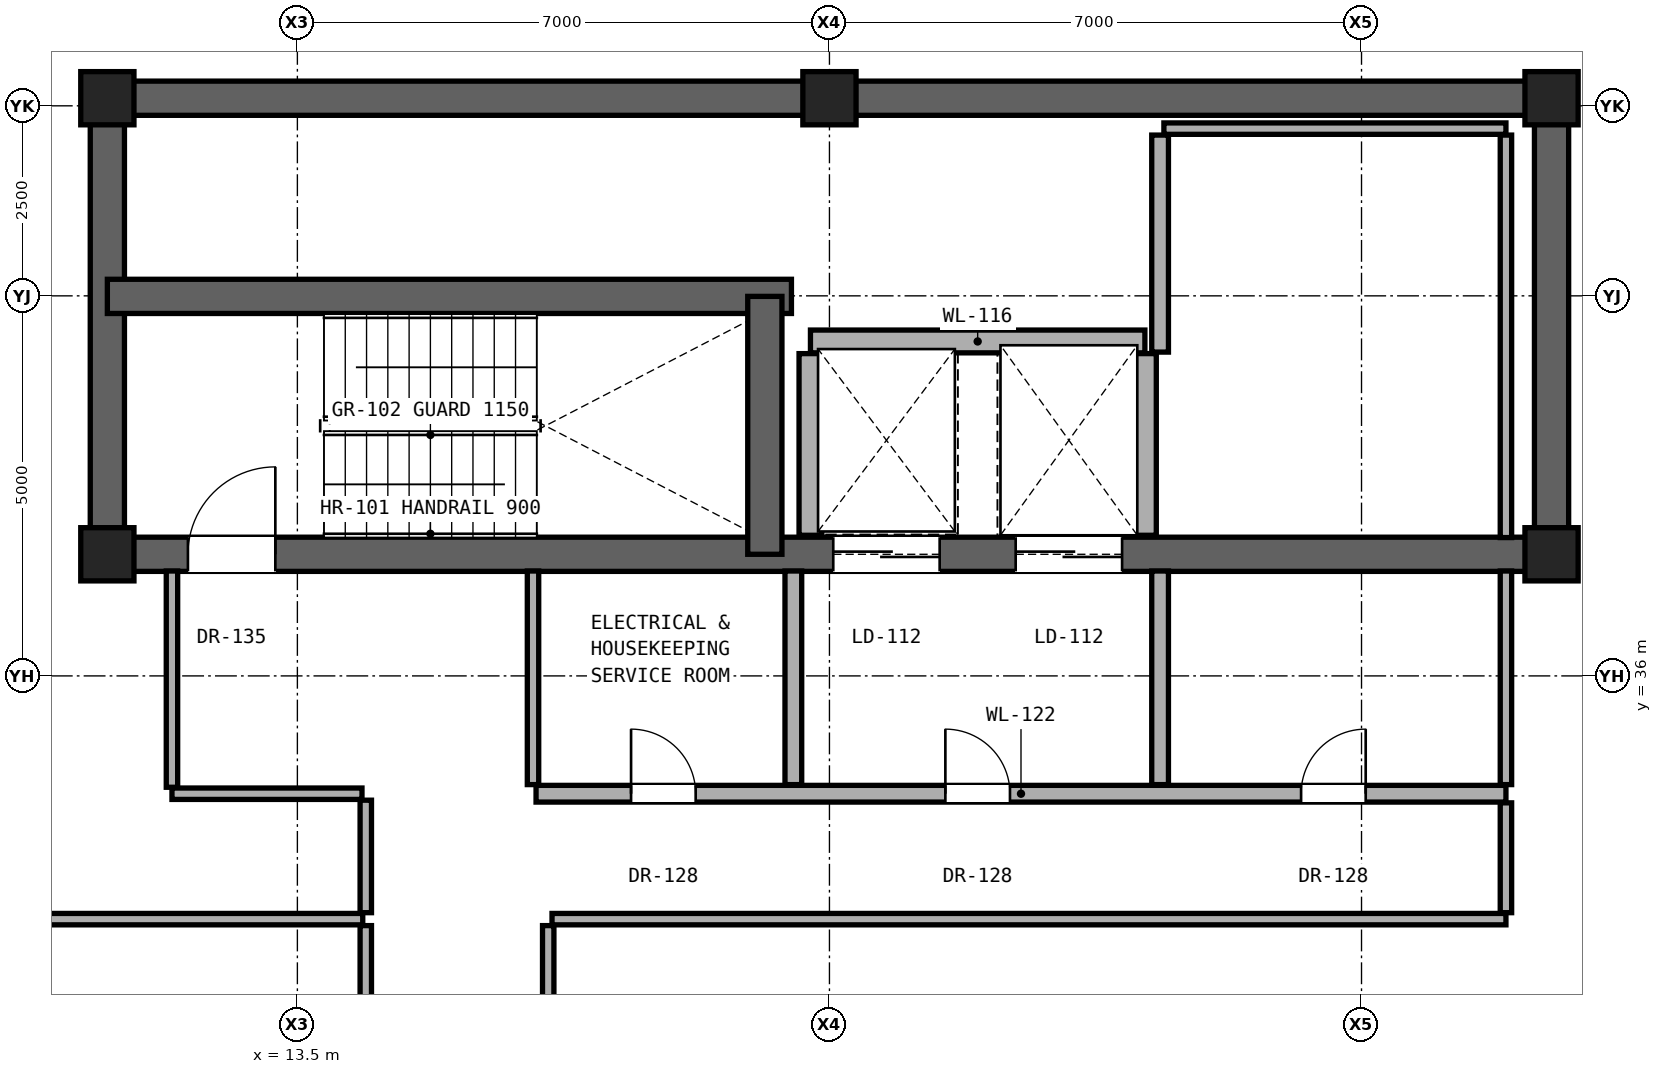
"""IFC4 building model, lengths in metres.
Left out: names, types, materials, properties, quantities, classifications, styles, units other than length and angle.
Written with IfcOpenShell. Run it as: python <this file> out.ifc"""

import sys

from ifc_helpers import new_model, si_unit, direction, frame, frame_2d, origin, origin_2d, place, context, subcontext, project, spatial, rectangle, extrude, element, fill, save


model = new_model("IFC4")
c1 = context("Model", 3, precision=1e-05, world=origin(), true_north=direction((0.0, 1.0)))
c2 = subcontext(c1, "Body", "Model", "MODEL_VIEW")
j1 = project(units=[si_unit("LENGTHUNIT", "METRE"), si_unit("PLANEANGLEUNIT", "RADIAN")], contexts=[c1])
p1 = place(None, origin())
s1 = spatial("IfcSite", under=j1, at=p1, CompositionType="ELEMENT")
p2 = place(p1, origin())
s2 = spatial("IfcBuilding", under=s1, at=p2, CompositionType="ELEMENT")
p3 = place(p2, frame((0.0, 0.0, 273.9)))
s3 = spatial("IfcBuildingStorey", under=s2, at=p3, CompositionType="ELEMENT", Elevation=273.9)
for number, where, z_axis, x_axis in (
    (1, (11.0, 37.6, 0.0), (0.0, 0.0, 1.0), (1.0, 0.0, 0.0)),
    (2, (30.0, 37.6, 0.0), (0.0, 0.0, 1.0), (1.0, 0.0, 0.0)),
    (3, (11.0, 43.6, 0.0), (0.0, 0.0, 1.0), (1.0, 0.0, 0.0)),
    (4, (20.5, 43.6, 0.0), (0.0, 0.0, 1.0), (1.0, 0.0, 0.0)),
    (5, (30.0, 43.6, 0.0), (0.0, 0.0, 1.0), (1.0, 0.0, 0.0)),
):
    element("IfcColumn", number, at=place(p3, frame(where, z_axis=z_axis, x_axis=x_axis)), inside=s3, PredefinedType="COLUMN", context=c2, shape_type="SweptSolid", body=[
        extrude(rectangle(XDim=0.7, YDim=0.7, at=origin_2d()), origin(), (0.0, 0.0, 1.0), 2.6),
    ])
p4 = place(p3, frame((11.0, 43.6, 0.0), z_axis=(0.0, 0.0, 1.0), x_axis=(1.0, 0.0, 0.0)))
e6 = element("IfcWall", 6, at=p4, inside=s3, PredefinedType="SHEAR", context=c2, shape_type="SweptSolid", body=[
    extrude(rectangle(XDim=19.0, YDim=0.45, at=frame_2d((9.5, 0.0))), origin(), (0.0, 0.0, 1.0), 2.37),
])
p5 = place(p3, frame((11.0, 37.6, 0.0), z_axis=(0.0, 0.0, 1.0), x_axis=(0.0, 1.0, 0.0)))
e7 = element("IfcWall", 7, at=p5, inside=s3, PredefinedType="SHEAR", context=c2, shape_type="SweptSolid", body=[
    extrude(rectangle(XDim=6.0, YDim=0.45, at=frame_2d((3.0, 0.0))), origin(), (0.0, 0.0, 1.0), 1.79),
])
p6 = place(p3, frame((30.0, 37.6, 0.0), z_axis=(0.0, 0.0, 1.0), x_axis=(0.0, 1.0, 0.0)))
e8 = element("IfcWall", 8, at=p6, inside=s3, PredefinedType="SHEAR", context=c2, shape_type="SweptSolid", body=[
    extrude(rectangle(XDim=6.0, YDim=0.45, at=frame_2d((3.0, 0.0))), origin(), (0.0, 0.0, 1.0), 2.37),
])
p7 = place(p3, frame((11.0, 37.6, 0.0), z_axis=(0.0, 0.0, 1.0), x_axis=(1.0, 0.0, 0.0)))
e9 = element("IfcWall", 9, at=p7, inside=s3, PredefinedType="SHEAR", context=c2, shape_type="SweptSolid", body=[
    extrude(rectangle(XDim=19.0, YDim=0.45, at=frame_2d((9.5, 0.0))), origin(), (0.0, 0.0, 1.0), 2.37),
])
p8 = place(p7, frame((1.06, 0.0, 0.0)))
e10 = element("IfcOpeningElement", 10, at=p8, cuts=e9, PredefinedType="OPENING", context=c2, shape_type="SweptSolid", body=[
    extrude(rectangle(XDim=1.15, YDim=2.2, at=frame_2d((0.575, 1.1))), frame((0.0, 0.235, 0.0), z_axis=(0.0, -1.0, 0.0), x_axis=(1.0, 0.0, 0.0)), (0.0, 0.0, 1.0), 0.47),
])
p9 = place(p7, frame((9.55, 0.0, 0.0)))
e11 = element("IfcOpeningElement", 11, at=p9, cuts=e9, PredefinedType="OPENING", context=c2, shape_type="SweptSolid", body=[
    extrude(rectangle(XDim=1.4, YDim=2.35, at=frame_2d((0.7, 1.175))), frame((0.0, 0.235, 0.0), z_axis=(0.0, -1.0, 0.0), x_axis=(1.0, 0.0, 0.0)), (0.0, 0.0, 1.0), 0.47),
])
p10 = place(p7, frame((11.95, 0.0, 0.0)))
e12 = element("IfcOpeningElement", 12, at=p10, cuts=e9, PredefinedType="OPENING", context=c2, shape_type="SweptSolid", body=[
    extrude(rectangle(XDim=1.4, YDim=2.35, at=frame_2d((0.7, 1.175))), frame((0.0, 0.235, 0.0), z_axis=(0.0, -1.0, 0.0), x_axis=(1.0, 0.0, 0.0)), (0.0, 0.0, 1.0), 0.47),
])
p11 = place(p3, frame((11.0, 40.993, 0.0), z_axis=(0.0, 0.0, 1.0), x_axis=(1.0, 0.0, 0.0)))
e13 = element("IfcWall", 13, at=p11, inside=s3, PredefinedType="SHEAR", context=c2, shape_type="SweptSolid", body=[
    extrude(rectangle(XDim=9.0, YDim=0.45, at=frame_2d((4.5, 0.0))), origin(), (0.0, 0.0, 1.0), 2.37),
])
p12 = place(p3, frame((19.65, 37.6, 0.0), z_axis=(0.0, 0.0, 1.0), x_axis=(0.0, 1.0, 0.0)))
e14 = element("IfcWall", 14, at=p12, inside=s3, PredefinedType="SHEAR", context=c2, shape_type="SweptSolid", body=[
    extrude(rectangle(XDim=3.393, YDim=0.45, at=frame_2d((1.696, 0.0))), origin(), (0.0, 0.0, 1.0), 2.37),
])
p13 = place(p3, frame((3.2, 32.8, 0.0), z_axis=(0.0, 0.0, 1.0), x_axis=(1.0, 0.0, 0.0)))
e15 = element("IfcWall", 15, at=p13, inside=s3, PredefinedType="PARTITIONING", context=c2, shape_type="SweptSolid", body=[
    extrude(rectangle(XDim=11.16, YDim=0.15, at=frame_2d((5.58, 0.0))), origin(), (0.0, 0.0, 1.0), 2.032),
])
p14 = place(p3, frame((16.85, 32.8, 0.0), z_axis=(0.0, 0.0, 1.0), x_axis=(1.0, 0.0, 0.0)))
e16 = element("IfcWall", 16, at=p14, inside=s3, PredefinedType="PARTITIONING", context=c2, shape_type="SweptSolid", body=[
    extrude(rectangle(XDim=12.55, YDim=0.15, at=frame_2d((6.275, 0.0))), origin(), (0.0, 0.0, 1.0), 2.032),
])
p15 = place(p3, frame((11.85, 34.45, 0.0), z_axis=(0.0, 0.0, 1.0), x_axis=(1.0, 0.0, 0.0)))
e17 = element("IfcWall", 17, at=p15, inside=s3, PredefinedType="PARTITIONING", context=c2, shape_type="SweptSolid", body=[
    extrude(rectangle(XDim=2.5, YDim=0.15, at=frame_2d((1.25, 0.0))), origin(), (0.0, 0.0, 1.0), 2.37),
])
p16 = place(p3, frame((16.64, 34.45, 0.0), z_axis=(0.0, 0.0, 1.0), x_axis=(1.0, 0.0, 0.0)))
e18 = element("IfcWall", 18, at=p16, inside=s3, PredefinedType="SOLIDWALL", context=c2, shape_type="SweptSolid", body=[
    extrude(rectangle(XDim=12.76, YDim=0.22, at=frame_2d((6.38, 0.0))), origin(), (0.0, 0.0, 1.0), 2.032),
])
p17 = place(p16, frame((5.385, 0.0, 0.0)))
e19 = element("IfcOpeningElement", 19, at=p17, cuts=e18, PredefinedType="OPENING", context=c2, shape_type="SweptSolid", body=[
    extrude(rectangle(XDim=0.85, YDim=2.01, at=frame_2d((0.425, 1.005))), frame((0.0, 0.12, 0.0), z_axis=(0.0, -1.0, 0.0), x_axis=(1.0, 0.0, 0.0)), (0.0, 0.0, 1.0), 0.24),
])
p18 = place(p16, frame((10.065, 0.0, 0.0)))
e20 = element("IfcOpeningElement", 20, at=p18, cuts=e18, PredefinedType="OPENING", context=c2, shape_type="SweptSolid", body=[
    extrude(rectangle(XDim=0.85, YDim=2.01, at=frame_2d((0.425, 1.005))), frame((0.0, 0.12, 0.0), z_axis=(0.0, -1.0, 0.0), x_axis=(1.0, 0.0, 0.0)), (0.0, 0.0, 1.0), 0.24),
])
p19 = place(p16, frame((1.25, 0.0, 0.0)))
e21 = element("IfcOpeningElement", 21, at=p19, cuts=e18, PredefinedType="OPENING", context=c2, shape_type="SweptSolid", body=[
    extrude(rectangle(XDim=0.85, YDim=2.01, at=frame_2d((0.425, 1.005))), frame((0.0, 0.12, 0.0), z_axis=(0.0, -1.0, 0.0), x_axis=(1.0, 0.0, 0.0)), (0.0, 0.0, 1.0), 0.24),
])
p20 = place(p3, frame((20.25, 40.4, 0.0), z_axis=(0.0, 0.0, 1.0), x_axis=(1.0, 0.0, 0.0)))
e22 = element("IfcWall", 22, at=p20, inside=s3, PredefinedType="SOLIDWALL", context=c2, shape_type="SweptSolid", body=[
    extrude(rectangle(XDim=4.4, YDim=0.3, at=frame_2d((2.2, 0.0))), origin(), (0.0, 0.0, 1.0), 2.37),
])
p21 = place(p3, frame((24.9, 43.2, 0.0), z_axis=(0.0, 0.0, 1.0), x_axis=(1.0, 0.0, 0.0)))
e23 = element("IfcWall", 23, at=p21, inside=s3, PredefinedType="PARTITIONING", context=c2, shape_type="SweptSolid", body=[
    extrude(rectangle(XDim=4.5, YDim=0.15, at=frame_2d((2.25, 0.0))), origin(), (0.0, 0.0, 1.0), 2.37),
])
p22 = place(p3, frame((11.85, 34.535, 0.0), z_axis=(0.0, 0.0, 1.0), x_axis=(0.0, 1.0, 0.0)))
e24 = element("IfcWall", 24, at=p22, inside=s3, PredefinedType="PARTITIONING", context=c2, shape_type="SweptSolid", body=[
    extrude(rectangle(XDim=2.845, YDim=0.15, at=frame_2d((1.422, 0.0))), origin(), (0.0, 0.0, 1.0), 2.37),
])
p23 = place(p3, frame((14.4, 20.785, 0.0), z_axis=(0.0, 0.0, 1.0), x_axis=(0.0, 1.0, 0.0)))
e25 = element("IfcWall", 25, at=p23, inside=s3, PredefinedType="PARTITIONING", context=c2, shape_type="SweptSolid", body=[
    extrude(rectangle(XDim=11.93, YDim=0.15, at=frame_2d((5.965, 0.0))), origin(), (0.0, 0.0, 1.0), 2.032),
])
p24 = place(p23, frame((5.54, 0.0, 0.0)))
e26 = element("IfcOpeningElement", 26, at=p24, cuts=e25, PredefinedType="OPENING", context=c2, shape_type="SweptSolid", body=[
    extrude(rectangle(XDim=0.85, YDim=2.01, at=frame_2d((0.425, 1.005))), frame((0.0, 0.085, 0.0), z_axis=(0.0, -1.0, 0.0), x_axis=(1.0, 0.0, 0.0)), (0.0, 0.0, 1.0), 0.17),
])
p25 = place(p3, frame((14.4, 32.885, 0.0), z_axis=(0.0, 0.0, 1.0), x_axis=(0.0, 1.0, 0.0)))
e27 = element("IfcWall", 27, at=p25, inside=s3, PredefinedType="PARTITIONING", context=c2, shape_type="SweptSolid", body=[
    extrude(rectangle(XDim=1.48, YDim=0.15, at=frame_2d((0.74, 0.0))), origin(), (0.0, 0.0, 1.0), 2.37),
])
p26 = place(p3, frame((16.6, 34.57, 0.0), z_axis=(0.0, 0.0, 1.0), x_axis=(0.0, 1.0, 0.0)))
e28 = element("IfcWall", 28, at=p26, inside=s3, PredefinedType="PARTITIONING", context=c2, shape_type="SweptSolid", body=[
    extrude(rectangle(XDim=2.81, YDim=0.15, at=frame_2d((1.405, 0.0))), origin(), (0.0, 0.0, 1.0), 2.37),
])
p27 = place(p3, frame((16.8, 20.785, 0.0), z_axis=(0.0, 0.0, 1.0), x_axis=(0.0, 1.0, 0.0)))
e29 = element("IfcWall", 29, at=p27, inside=s3, PredefinedType="PARTITIONING", context=c2, shape_type="SweptSolid", body=[
    extrude(rectangle(XDim=11.93, YDim=0.15, at=frame_2d((5.965, 0.0))), origin(), (0.0, 0.0, 1.0), 2.032),
])
p28 = place(p27, frame((6.79, 0.0, 0.0)))
e30 = element("IfcOpeningElement", 30, at=p28, cuts=e29, PredefinedType="OPENING", context=c2, shape_type="SweptSolid", body=[
    extrude(rectangle(XDim=0.85, YDim=2.01, at=frame_2d((0.425, 1.005))), frame((0.0, 0.085, 0.0), z_axis=(0.0, -1.0, 0.0), x_axis=(1.0, 0.0, 0.0)), (0.0, 0.0, 1.0), 0.17),
])
p29 = place(p27, frame((1.39, 0.0, 0.0)))
e31 = element("IfcOpeningElement", 31, at=p29, cuts=e29, PredefinedType="OPENING", context=c2, shape_type="SweptSolid", body=[
    extrude(rectangle(XDim=0.85, YDim=2.01, at=frame_2d((0.425, 1.005))), frame((0.0, 0.085, 0.0), z_axis=(0.0, -1.0, 0.0), x_axis=(1.0, 0.0, 0.0)), (0.0, 0.0, 1.0), 0.17),
])
p30 = place(p3, frame((20.025, 34.57, 0.0), z_axis=(0.0, 0.0, 1.0), x_axis=(0.0, 1.0, 0.0)))
e32 = element("IfcWall", 32, at=p30, inside=s3, PredefinedType="SOLIDWALL", context=c2, shape_type="SweptSolid", body=[
    extrude(rectangle(XDim=2.81, YDim=0.22, at=frame_2d((1.405, 0.0))), origin(), (0.0, 0.0, 1.0), 2.37),
])
for number, where, z_axis, x_axis in (
    (33, (20.25, 37.85, 0.0), (0.0, 0.0, 1.0), (0.0, 1.0, 0.0)),
    (34, (24.65, 37.85, 0.0), (0.0, 0.0, 1.0), (0.0, 1.0, 0.0)),
):
    element("IfcWall", number, at=place(p3, frame(where, z_axis=z_axis, x_axis=x_axis)), inside=s3, PredefinedType="SOLIDWALL", context=c2, shape_type="SweptSolid", body=[
        extrude(rectangle(XDim=2.39, YDim=0.3, at=frame_2d((1.195, 0.0))), origin(), (0.0, 0.0, 1.0), 2.37),
    ])
p31 = place(p3, frame((24.85, 34.57, 0.0), z_axis=(0.0, 0.0, 1.0), x_axis=(0.0, 1.0, 0.0)))
e35 = element("IfcWall", 35, at=p31, inside=s3, PredefinedType="SOLIDWALL", context=c2, shape_type="SweptSolid", body=[
    extrude(rectangle(XDim=2.81, YDim=0.22, at=frame_2d((1.405, 0.0))), origin(), (0.0, 0.0, 1.0), 2.37),
])
p32 = place(p3, frame((24.85, 40.26, 0.0), z_axis=(0.0, 0.0, 1.0), x_axis=(0.0, 1.0, 0.0)))
e36 = element("IfcWall", 36, at=p32, inside=s3, PredefinedType="SOLIDWALL", context=c2, shape_type="SweptSolid", body=[
    extrude(rectangle(XDim=2.855, YDim=0.22, at=frame_2d((1.427, 0.0))), origin(), (0.0, 0.0, 1.0), 2.37),
])
p33 = place(p3, frame((29.4, 32.885, 0.0), z_axis=(0.0, 0.0, 1.0), x_axis=(0.0, 1.0, 0.0)))
e37 = element("IfcWall", 37, at=p33, inside=s3, PredefinedType="PARTITIONING", context=c2, shape_type="SweptSolid", body=[
    extrude(rectangle(XDim=1.445, YDim=0.15, at=frame_2d((0.723, 0.0))), origin(), (0.0, 0.0, 1.0), 2.37),
])
p34 = place(p3, frame((29.4, 34.57, 0.0), z_axis=(0.0, 0.0, 1.0), x_axis=(0.0, 1.0, 0.0)))
e38 = element("IfcWall", 38, at=p34, inside=s3, PredefinedType="PARTITIONING", context=c2, shape_type="SweptSolid", body=[
    extrude(rectangle(XDim=2.81, YDim=0.15, at=frame_2d((1.405, 0.0))), origin(), (0.0, 0.0, 1.0), 2.37),
])
p35 = place(p3, frame((29.4, 37.82, 0.0), z_axis=(0.0, 0.0, 1.0), x_axis=(0.0, 1.0, 0.0)))
e39 = element("IfcWall", 39, at=p35, inside=s3, PredefinedType="PARTITIONING", context=c2, shape_type="SweptSolid", body=[
    extrude(rectangle(XDim=5.295, YDim=0.15, at=frame_2d((2.647, 0.0))), origin(), (0.0, 0.0, 1.0), 2.37),
])
p36 = place(p8, origin())
e40 = element("IfcDoor", 40, at=p36, inside=s3, OperationType="SINGLE_SWING_RIGHT", PredefinedType="DOOR", context=c2, shape_type="SweptSolid", body=[
    extrude(rectangle(XDim=1.15, YDim=2.2, at=frame_2d((0.575, 1.1))), frame((0.0, 0.025, 0.0), z_axis=(0.0, -1.0, 0.0), x_axis=(1.0, 0.0, 0.0)), (0.0, 0.0, 1.0), 0.05),
])
fill(e10, e40)
p37 = place(p17, origin())
e41 = element("IfcDoor", 41, at=p37, inside=s3, OperationType="SINGLE_SWING_LEFT", PredefinedType="DOOR", context=c2, shape_type="SweptSolid", body=[
    extrude(rectangle(XDim=0.85, YDim=2.01, at=frame_2d((0.425, 1.005))), frame((0.0, 0.025, 0.0), z_axis=(0.0, -1.0, 0.0), x_axis=(1.0, 0.0, 0.0)), (0.0, 0.0, 1.0), 0.05),
])
fill(e19, e41)
p38 = place(p18, origin())
e42 = element("IfcDoor", 42, at=p38, inside=s3, OperationType="SINGLE_SWING_RIGHT", PredefinedType="DOOR", context=c2, shape_type="SweptSolid", body=[
    extrude(rectangle(XDim=0.85, YDim=2.01, at=frame_2d((0.425, 1.005))), frame((0.0, 0.025, 0.0), z_axis=(0.0, -1.0, 0.0), x_axis=(1.0, 0.0, 0.0)), (0.0, 0.0, 1.0), 0.05),
])
fill(e20, e42)
p39 = place(p19, origin())
e43 = element("IfcDoor", 43, at=p39, inside=s3, OperationType="SINGLE_SWING_LEFT", PredefinedType="DOOR", context=c2, shape_type="SweptSolid", body=[
    extrude(rectangle(XDim=0.85, YDim=2.01, at=frame_2d((0.425, 1.005))), frame((0.0, 0.025, 0.0), z_axis=(0.0, -1.0, 0.0), x_axis=(1.0, 0.0, 0.0)), (0.0, 0.0, 1.0), 0.05),
])
fill(e21, e43)
p40 = place(p9, origin())
e44 = element("IfcDoor", 44, at=p40, inside=s3, OperationType="DOUBLE_DOOR_SLIDING", PredefinedType="DOOR", context=c2, shape_type="SweptSolid", body=[
    extrude(rectangle(XDim=1.4, YDim=2.35, at=frame_2d((0.7, 1.175))), frame((0.0, 0.025, 0.0), z_axis=(0.0, -1.0, 0.0), x_axis=(1.0, 0.0, 0.0)), (0.0, 0.0, 1.0), 0.05),
])
fill(e11, e44)
p41 = place(p10, origin())
e45 = element("IfcDoor", 45, at=p41, inside=s3, OperationType="DOUBLE_DOOR_SLIDING", PredefinedType="DOOR", context=c2, shape_type="SweptSolid", body=[
    extrude(rectangle(XDim=1.4, YDim=2.35, at=frame_2d((0.7, 1.175))), frame((0.0, 0.025, 0.0), z_axis=(0.0, -1.0, 0.0), x_axis=(1.0, 0.0, 0.0)), (0.0, 0.0, 1.0), 0.05),
])
fill(e12, e45)
save(model, sys.argv[1])
